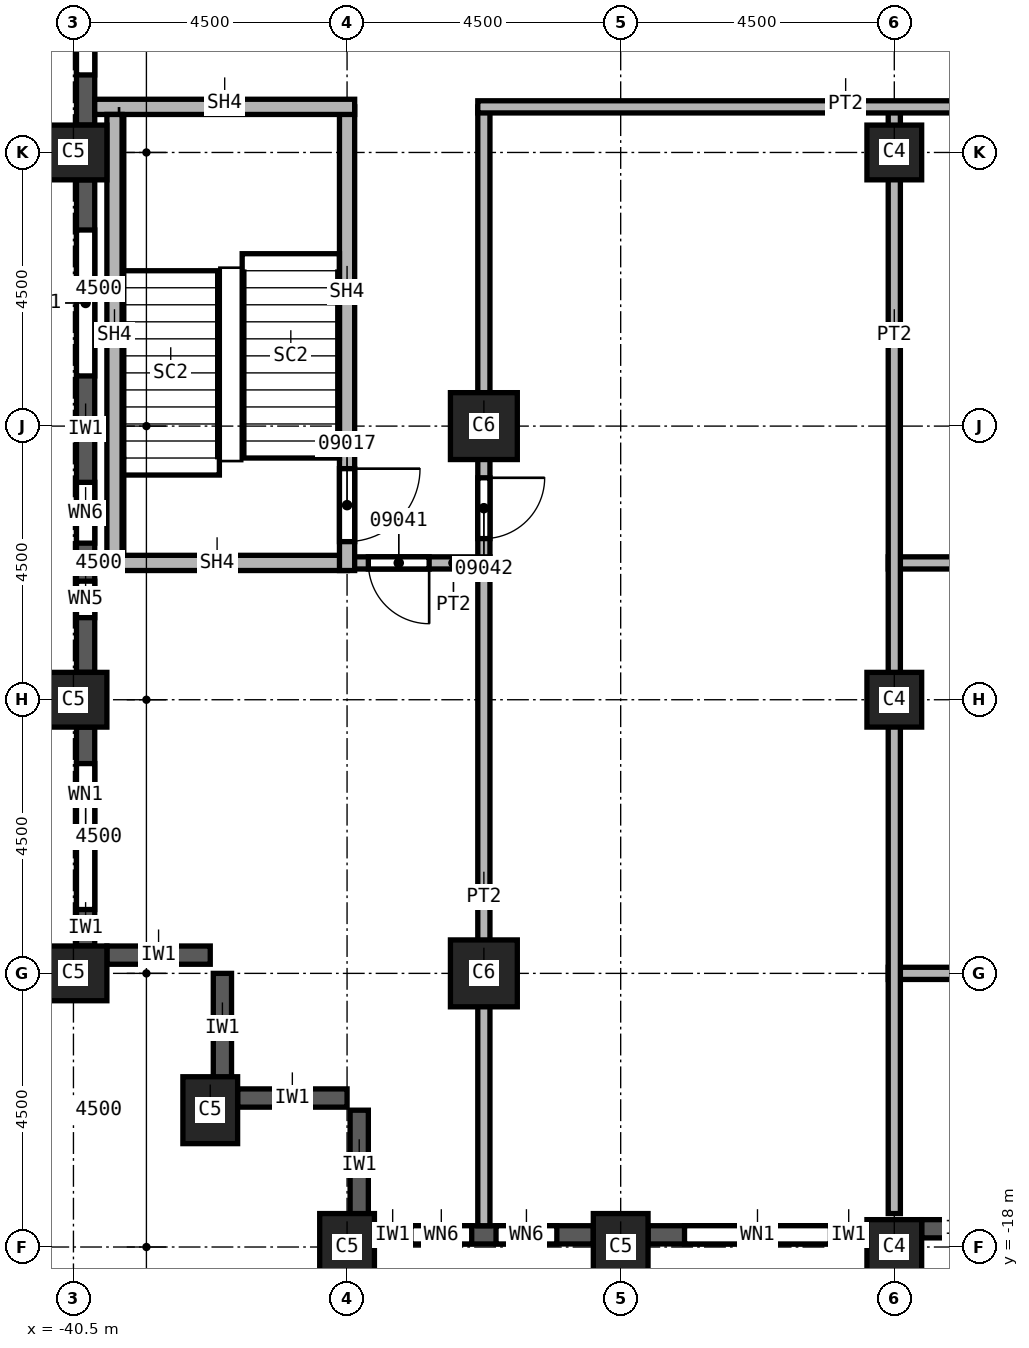
"""IFC4 building model, lengths in metres.
Left out: names, types, materials, properties, quantities, classifications, styles, units other than length and angle.
Written with IfcOpenShell. Run it as: python <this file> out.ifc"""

import sys

from ifc_helpers import new_model, si_unit, direction, frame, frame_2d, origin, origin_2d, place, context, subcontext, project, spatial, rectangle, extrude, element, fill, save


model = new_model("IFC4")
c1 = context("Model", 3, precision=1e-05, world=origin(), true_north=direction((0.0, 1.0)))
c2 = subcontext(c1, "Body", "Model", "MODEL_VIEW")
j1 = project(units=[si_unit("LENGTHUNIT", "METRE"), si_unit("PLANEANGLEUNIT", "RADIAN")], contexts=[c1])
p1 = place(None, origin())
s1 = spatial("IfcSite", under=j1, at=p1, CompositionType="ELEMENT")
p2 = place(p1, origin())
s2 = spatial("IfcBuilding", under=s1, at=p2, CompositionType="ELEMENT")
p3 = place(p2, frame((0.0, 0.0, 166.0)))
s3 = spatial("IfcBuildingStorey", under=s2, at=p3, CompositionType="ELEMENT", Elevation=166.0)
for number, where, z_axis, x_axis in (
    (1, (-40.5, 0.0, 0.0), (0.0, 0.0, 1.0), (0.0, 1.0, 0.0)),
    (2, (-40.5, -9.0, 0.0), (0.0, 0.0, 1.0), (0.0, 1.0, 0.0)),
    (3, (-40.5, -13.5, 0.0), (0.0, 0.0, 1.0), (0.0, 1.0, 0.0)),
    (4, (-38.25, -15.75, 0.0), (0.0, 0.0, 1.0), (1.0, 0.0, 0.0)),
    (5, (-31.5, -18.0, 0.0), (0.0, 0.0, 1.0), (1.0, 0.0, 0.0)),
    (6, (-36.0, -18.0, 0.0), (0.0, 0.0, 1.0), (1.0, 0.0, 0.0)),
):
    element("IfcColumn", number, at=place(p3, frame(where, z_axis=z_axis, x_axis=x_axis)), inside=s3, PredefinedType="COLUMN", context=c2, shape_type="SweptSolid", body=[
        extrude(rectangle(XDim=0.9, YDim=1.1, at=origin_2d()), origin(), (0.0, 0.0, 1.0), 3.7),
    ])
for number, where, z_axis, x_axis in (
    (7, (-33.75, -4.5, 0.0), (0.0, 0.0, 1.0), (1.0, 0.0, 0.0)),
    (8, (-33.75, -13.5, 0.0), (0.0, 0.0, 1.0), (1.0, 0.0, 0.0)),
):
    element("IfcColumn", number, at=place(p3, frame(where, z_axis=z_axis, x_axis=x_axis)), inside=s3, PredefinedType="COLUMN", context=c2, shape_type="SweptSolid", body=[
        extrude(rectangle(XDim=1.1, YDim=1.1, at=origin_2d()), origin(), (0.0, 0.0, 1.0), 3.7),
    ])
for number, where, z_axis, x_axis in (
    (9, (-27.0, 0.0, 0.0), (0.0, 0.0, 1.0), (1.0, 0.0, 0.0)),
    (10, (-27.0, -9.0, 0.0), (0.0, 0.0, 1.0), (1.0, 0.0, 0.0)),
    (11, (-27.0, -18.0, 0.0), (0.0, 0.0, 1.0), (1.0, 0.0, 0.0)),
):
    element("IfcColumn", number, at=place(p3, frame(where, z_axis=z_axis, x_axis=x_axis)), inside=s3, PredefinedType="COLUMN", context=c2, shape_type="SweptSolid", body=[
        extrude(rectangle(XDim=0.9, YDim=0.9, at=origin_2d()), origin(), (0.0, 0.0, 1.0), 3.7),
    ])
p4 = place(p3, frame((-39.95, -13.2, 0.0), z_axis=(0.0, 0.0, 1.0), x_axis=(1.0, 0.0, 0.0)))
e12 = element("IfcWall", 12, at=p4, inside=s3, PredefinedType="SOLIDWALL", context=c2, shape_type="SweptSolid", body=[
    extrude(rectangle(XDim=1.7, YDim=0.3, at=frame_2d((0.85, 0.0))), origin(), (0.0, 0.0, 1.0), 3.1),
])
for number, where, z_axis, x_axis in (
    (13, (-38.05, -15.3, 0.0), (0.0, 0.0, 1.0), (0.0, 1.0, 0.0)),
    (14, (-37.8, -15.55, 0.0), (0.0, 0.0, 1.0), (1.0, 0.0, 0.0)),
    (15, (-35.8, -17.55, 0.0), (0.0, 0.0, 1.0), (0.0, 1.0, 0.0)),
):
    element("IfcWall", number, at=place(p3, frame(where, z_axis=z_axis, x_axis=x_axis)), inside=s3, PredefinedType="SOLIDWALL", context=c2, shape_type="SweptSolid", body=[
        extrude(rectangle(XDim=1.8, YDim=0.3, at=frame_2d((0.9, 0.0))), origin(), (0.0, 0.0, 1.0), 3.1),
    ])
p5 = place(p3, frame((-40.3, 8.55, 0.0), z_axis=(0.0, 0.0, 1.0), x_axis=(0.0, -1.0, 0.0)))
e16 = element("IfcWall", 16, at=p5, inside=s3, PredefinedType="SOLIDWALL", context=c2, shape_type="SweptSolid", body=[
    extrude(rectangle(XDim=8.1, YDim=0.3, at=frame_2d((4.05, 0.0))), origin(), (0.0, 0.0, 1.0), 3.1),
])
p6 = place(p5, frame((0.825, 0.0, 0.8)))
e17 = element("IfcOpeningElement", 17, at=p6, cuts=e16, PredefinedType="OPENING", context=c2, shape_type="SweptSolid", body=[
    extrude(rectangle(XDim=2.4, YDim=1.95, at=frame_2d((1.2, 0.975))), frame((0.0, 0.15, 0.0), z_axis=(0.0, -1.0, 0.0), x_axis=(1.0, 0.0, 0.0)), (0.0, 0.0, 1.0), 0.3),
])
p7 = place(p5, frame((4.875, 0.0, 0.8)))
e18 = element("IfcOpeningElement", 18, at=p7, cuts=e16, PredefinedType="OPENING", context=c2, shape_type="SweptSolid", body=[
    extrude(rectangle(XDim=2.4, YDim=1.95, at=frame_2d((1.2, 0.975))), frame((0.0, 0.15, 0.0), z_axis=(0.0, -1.0, 0.0), x_axis=(1.0, 0.0, 0.0)), (0.0, 0.0, 1.0), 0.3),
])
p8 = place(p3, frame((-40.3, -0.45, 0.0), z_axis=(0.0, 0.0, 1.0), x_axis=(0.0, -1.0, 0.0)))
e19 = element("IfcWall", 19, at=p8, inside=s3, PredefinedType="SOLIDWALL", context=c2, shape_type="SweptSolid", body=[
    extrude(rectangle(XDim=8.1, YDim=0.3, at=frame_2d((4.05, 0.0))), origin(), (0.0, 0.0, 1.0), 3.1),
])
p9 = place(p8, frame((0.825, 0.0, 0.8)))
e20 = element("IfcOpeningElement", 20, at=p9, cuts=e19, PredefinedType="OPENING", context=c2, shape_type="SweptSolid", body=[
    extrude(rectangle(XDim=2.4, YDim=1.95, at=frame_2d((1.2, 0.975))), frame((0.0, 0.15, 0.0), z_axis=(0.0, -1.0, 0.0), x_axis=(1.0, 0.0, 0.0)), (0.0, 0.0, 1.0), 0.3),
])
p10 = place(p8, frame((4.975, 0.0, 0.8)))
e21 = element("IfcOpeningElement", 21, at=p10, cuts=e19, PredefinedType="OPENING", context=c2, shape_type="SweptSolid", body=[
    extrude(rectangle(XDim=1.0, YDim=1.95, at=frame_2d((0.5, 0.975))), frame((0.0, 0.15, 0.0), z_axis=(0.0, -1.0, 0.0), x_axis=(1.0, 0.0, 0.0)), (0.0, 0.0, 1.0), 0.3),
])
p11 = place(p8, frame((6.6, 0.0, 0.8)))
e22 = element("IfcOpeningElement", 22, at=p11, cuts=e19, PredefinedType="OPENING", context=c2, shape_type="SweptSolid", body=[
    extrude(rectangle(XDim=0.6, YDim=1.95, at=frame_2d((0.3, 0.975))), frame((0.0, 0.15, 0.0), z_axis=(0.0, -1.0, 0.0), x_axis=(1.0, 0.0, 0.0)), (0.0, 0.0, 1.0), 0.3),
])
p12 = place(p3, frame((-40.3, -9.45, 0.0), z_axis=(0.0, 0.0, 1.0), x_axis=(0.0, -1.0, 0.0)))
e23 = element("IfcWall", 23, at=p12, inside=s3, PredefinedType="SOLIDWALL", context=c2, shape_type="SweptSolid", body=[
    extrude(rectangle(XDim=3.6, YDim=0.3, at=frame_2d((1.8, 0.0))), origin(), (0.0, 0.0, 1.0), 3.1),
])
p13 = place(p12, frame((0.6, 0.0, 0.8)))
e24 = element("IfcOpeningElement", 24, at=p13, cuts=e23, PredefinedType="OPENING", context=c2, shape_type="SweptSolid", body=[
    extrude(rectangle(XDim=2.4, YDim=1.95, at=frame_2d((1.2, 0.975))), frame((0.0, 0.15, 0.0), z_axis=(0.0, -1.0, 0.0), x_axis=(1.0, 0.0, 0.0)), (0.0, 0.0, 1.0), 0.3),
])
p14 = place(p3, frame((-35.55, -17.8, 0.0), z_axis=(0.0, 0.0, 1.0), x_axis=(1.0, 0.0, 0.0)))
e25 = element("IfcWall", 25, at=p14, inside=s3, PredefinedType="SOLIDWALL", context=c2, shape_type="SweptSolid", body=[
    extrude(rectangle(XDim=3.6, YDim=0.3, at=frame_2d((1.8, 0.0))), origin(), (0.0, 0.0, 1.0), 3.1),
])
p15 = place(p14, frame((0.6, 0.0, 0.8)))
e26 = element("IfcOpeningElement", 26, at=p15, cuts=e25, PredefinedType="OPENING", context=c2, shape_type="SweptSolid", body=[
    extrude(rectangle(XDim=1.0, YDim=1.95, at=frame_2d((0.5, 0.975))), frame((0.0, 0.15, 0.0), z_axis=(0.0, -1.0, 0.0), x_axis=(1.0, 0.0, 0.0)), (0.0, 0.0, 1.0), 0.3),
])
p16 = place(p14, frame((2.0, 0.0, 0.8)))
e27 = element("IfcOpeningElement", 27, at=p16, cuts=e25, PredefinedType="OPENING", context=c2, shape_type="SweptSolid", body=[
    extrude(rectangle(XDim=1.0, YDim=1.95, at=frame_2d((0.5, 0.975))), frame((0.0, 0.15, 0.0), z_axis=(0.0, -1.0, 0.0), x_axis=(1.0, 0.0, 0.0)), (0.0, 0.0, 1.0), 0.3),
])
p17 = place(p3, frame((-31.05, -17.8, 0.0), z_axis=(0.0, 0.0, 1.0), x_axis=(1.0, 0.0, 0.0)))
e28 = element("IfcWall", 28, at=p17, inside=s3, PredefinedType="SOLIDWALL", context=c2, shape_type="SweptSolid", body=[
    extrude(rectangle(XDim=3.6, YDim=0.3, at=frame_2d((1.8, 0.0))), origin(), (0.0, 0.0, 1.0), 3.1),
])
p18 = place(p17, frame((0.6, 0.0, 0.8)))
e29 = element("IfcOpeningElement", 29, at=p18, cuts=e28, PredefinedType="OPENING", context=c2, shape_type="SweptSolid", body=[
    extrude(rectangle(XDim=2.4, YDim=1.95, at=frame_2d((1.2, 0.975))), frame((0.0, 0.15, 0.0), z_axis=(0.0, -1.0, 0.0), x_axis=(1.0, 0.0, 0.0)), (0.0, 0.0, 1.0), 0.3),
])
p19 = place(p3, frame((-26.55, -17.7, 0.0), z_axis=(0.0, 0.0, 1.0), x_axis=(1.0, 0.0, 0.0)))
e30 = element("IfcWall", 30, at=p19, inside=s3, PredefinedType="SOLIDWALL", context=c2, shape_type="SweptSolid", body=[
    extrude(rectangle(XDim=1.35, YDim=0.3, at=frame_2d((0.675, 0.0))), origin(), (0.0, 0.0, 1.0), 3.1),
])
p20 = place(p3, frame((-33.75, 0.75, 0.0), z_axis=(0.0, 0.0, 1.0), x_axis=(0.0, -1.0, 0.0)))
e31 = element("IfcWall", 31, at=p20, inside=s3, PredefinedType="PARTITIONING", context=c2, shape_type="SweptSolid", body=[
    extrude(rectangle(XDim=18.4, YDim=0.2, at=frame_2d((9.2, 0.0))), origin(), (0.0, 0.0, 1.0), 3.7),
])
p21 = place(p20, frame((6.1, 0.0, 0.0)))
e32 = element("IfcOpeningElement", 32, at=p21, cuts=e31, PredefinedType="OPENING", context=c2, shape_type="SweptSolid", body=[
    extrude(rectangle(XDim=1.0, YDim=2.1, at=frame_2d((0.5, 1.05))), frame((0.0, 0.1, 0.0), z_axis=(0.0, -1.0, 0.0), x_axis=(1.0, 0.0, 0.0)), (0.0, 0.0, 1.0), 0.2),
])
p22 = place(p3, frame((-33.65, -6.75, 0.0), z_axis=(0.0, 0.0, 1.0), x_axis=(-1.0, 0.0, 0.0)))
e33 = element("IfcWall", 33, at=p22, inside=s3, PredefinedType="PARTITIONING", context=c2, shape_type="SweptSolid", body=[
    extrude(rectangle(XDim=2.35, YDim=0.2, at=frame_2d((1.175, 0.0))), origin(), (0.0, 0.0, 1.0), 3.7),
])
p23 = place(p22, frame((1.0, 0.0, 0.0)))
e34 = element("IfcOpeningElement", 34, at=p23, cuts=e33, PredefinedType="OPENING", context=c2, shape_type="SweptSolid", body=[
    extrude(rectangle(XDim=1.0, YDim=2.1, at=frame_2d((0.5, 1.05))), frame((0.0, 0.1, 0.0), z_axis=(0.0, -1.0, 0.0), x_axis=(1.0, 0.0, 0.0)), (0.0, 0.0, 1.0), 0.2),
])
for number, where, z_axis, x_axis in (
    (35, (-27.1, -13.5, 0.0), (0.0, 0.0, 1.0), (1.0, 0.0, 0.0)),
    (36, (-27.1, -6.75, 0.0), (0.0, 0.0, 1.0), (1.0, 0.0, 0.0)),
):
    element("IfcWall", number, at=place(p3, frame(where, z_axis=z_axis, x_axis=x_axis)), inside=s3, PredefinedType="PARTITIONING", context=c2, shape_type="SweptSolid", body=[
        extrude(rectangle(XDim=11.7, YDim=0.2, at=frame_2d((5.85, 0.0))), origin(), (0.0, 0.0, 1.0), 3.7),
    ])
p24 = place(p3, frame((-27.0, -17.45, 0.0), z_axis=(0.0, 0.0, 1.0), x_axis=(0.0, 1.0, 0.0)))
e37 = element("IfcWall", 37, at=p24, inside=s3, PredefinedType="PARTITIONING", context=c2, shape_type="SweptSolid", body=[
    extrude(rectangle(XDim=18.2, YDim=0.2, at=frame_2d((9.1, 0.0))), origin(), (0.0, 0.0, 1.0), 3.7),
])
p25 = place(p3, frame((-15.4, 0.75, 0.0), z_axis=(0.0, 0.0, 1.0), x_axis=(-1.0, 0.0, 0.0)))
e38 = element("IfcWall", 38, at=p25, inside=s3, PredefinedType="PARTITIONING", context=c2, shape_type="SweptSolid", body=[
    extrude(rectangle(XDim=18.45, YDim=0.2, at=frame_2d((9.225, 0.0))), origin(), (0.0, 0.0, 1.0), 3.7),
])
p26 = place(p25, frame((5.35, 0.0, 0.0)))
e39 = element("IfcOpeningElement", 39, at=p26, cuts=e38, PredefinedType="OPENING", context=c2, shape_type="SweptSolid", body=[
    extrude(rectangle(XDim=1.0, YDim=2.1, at=frame_2d((0.5, 1.05))), frame((0.0, 0.1, 0.0), z_axis=(0.0, -1.0, 0.0), x_axis=(1.0, 0.0, 0.0)), (0.0, 0.0, 1.0), 0.2),
])
p27 = place(p3, frame((-36.0, -6.75, 0.0), z_axis=(0.0, 0.0, 1.0), x_axis=(-1.0, 0.0, 0.0)))
e40 = element("IfcWall", 40, at=p27, inside=s3, PredefinedType="SOLIDWALL", context=c2, shape_type="SweptSolid", body=[
    extrude(rectangle(XDim=4.15, YDim=0.25, at=frame_2d((2.075, 0.0))), origin(), (0.0, 0.0, 1.0), 3.7),
])
p28 = place(p3, frame((-36.0, 0.75, 0.0), z_axis=(0.0, 0.0, 1.0), x_axis=(0.0, -1.0, 0.0)))
e41 = element("IfcWall", 41, at=p28, inside=s3, PredefinedType="SOLIDWALL", context=c2, shape_type="SweptSolid", body=[
    extrude(rectangle(XDim=7.625, YDim=0.25, at=frame_2d((3.812, 0.0))), origin(), (0.0, 0.0, 1.0), 3.7),
])
p29 = place(p28, frame((5.95, 0.0, 0.0)))
e42 = element("IfcOpeningElement", 42, at=p29, cuts=e41, PredefinedType="OPENING", context=c2, shape_type="SweptSolid", body=[
    extrude(rectangle(XDim=1.2, YDim=2.1, at=frame_2d((0.6, 1.05))), frame((0.0, 0.125, 0.0), z_axis=(0.0, -1.0, 0.0), x_axis=(1.0, 0.0, 0.0)), (0.0, 0.0, 1.0), 0.25),
])
p30 = place(p3, frame((-35.875, 0.75, 0.0), z_axis=(0.0, 0.0, 1.0), x_axis=(-1.0, 0.0, 0.0)))
e43 = element("IfcWall", 43, at=p30, inside=s3, PredefinedType="SOLIDWALL", context=c2, shape_type="SweptSolid", body=[
    extrude(rectangle(XDim=4.275, YDim=0.25, at=frame_2d((2.137, 0.0))), origin(), (0.0, 0.0, 1.0), 3.7),
])
p31 = place(p3, frame((-39.825, -6.625, 0.0), z_axis=(0.0, 0.0, 1.0), x_axis=(0.0, 1.0, 0.0)))
e44 = element("IfcWall", 44, at=p31, inside=s3, PredefinedType="SOLIDWALL", context=c2, shape_type="SweptSolid", body=[
    extrude(rectangle(XDim=7.25, YDim=0.25, at=frame_2d((3.625, 0.0))), origin(), (0.0, 0.0, 1.0), 3.7),
])
p32 = place(p7, origin())
e45 = element("IfcWindow", 45, at=p32, inside=s3, PartitioningType="SINGLE_PANEL", PredefinedType="WINDOW", context=c2, shape_type="SweptSolid", body=[
    extrude(rectangle(XDim=2.4, YDim=1.95, at=frame_2d((1.2, 0.975))), frame((0.0, 0.03, 0.0), z_axis=(0.0, -1.0, 0.0), x_axis=(1.0, 0.0, 0.0)), (0.0, 0.0, 1.0), 0.06),
])
fill(e18, e45)
p33 = place(p9, origin())
e46 = element("IfcWindow", 46, at=p33, inside=s3, PartitioningType="SINGLE_PANEL", PredefinedType="WINDOW", context=c2, shape_type="SweptSolid", body=[
    extrude(rectangle(XDim=2.4, YDim=1.95, at=frame_2d((1.2, 0.975))), frame((0.0, 0.03, 0.0), z_axis=(0.0, -1.0, 0.0), x_axis=(1.0, 0.0, 0.0)), (0.0, 0.0, 1.0), 0.06),
])
fill(e20, e46)
p34 = place(p13, origin())
e47 = element("IfcWindow", 47, at=p34, inside=s3, PartitioningType="SINGLE_PANEL", PredefinedType="WINDOW", context=c2, shape_type="SweptSolid", body=[
    extrude(rectangle(XDim=2.4, YDim=1.95, at=frame_2d((1.2, 0.975))), frame((0.0, 0.03, 0.0), z_axis=(0.0, -1.0, 0.0), x_axis=(1.0, 0.0, 0.0)), (0.0, 0.0, 1.0), 0.06),
])
fill(e24, e47)
p35 = place(p18, origin())
e48 = element("IfcWindow", 48, at=p35, inside=s3, PartitioningType="SINGLE_PANEL", PredefinedType="WINDOW", context=c2, shape_type="SweptSolid", body=[
    extrude(rectangle(XDim=2.4, YDim=1.95, at=frame_2d((1.2, 0.975))), frame((0.0, 0.03, 0.0), z_axis=(0.0, -1.0, 0.0), x_axis=(1.0, 0.0, 0.0)), (0.0, 0.0, 1.0), 0.06),
])
fill(e29, e48)
p36 = place(p29, origin())
e49 = element("IfcDoor", 49, at=p36, inside=s3, OperationType="SINGLE_SWING_RIGHT", PredefinedType="DOOR", context=c2, shape_type="SweptSolid", body=[
    extrude(rectangle(XDim=1.2, YDim=2.1, at=frame_2d((0.6, 1.05))), frame((0.0, 0.025, 0.0), z_axis=(0.0, -1.0, 0.0), x_axis=(1.0, 0.0, 0.0)), (0.0, 0.0, 1.0), 0.05),
])
fill(e42, e49)
p37 = place(p23, origin())
e50 = element("IfcDoor", 50, at=p37, inside=s3, OperationType="SINGLE_SWING_RIGHT", PredefinedType="DOOR", context=c2, shape_type="SweptSolid", body=[
    extrude(rectangle(XDim=1.0, YDim=2.1, at=frame_2d((0.5, 1.05))), frame((0.0, 0.025, 0.0), z_axis=(0.0, -1.0, 0.0), x_axis=(1.0, 0.0, 0.0)), (0.0, 0.0, 1.0), 0.05),
])
fill(e34, e50)
p38 = place(p21, origin())
e51 = element("IfcDoor", 51, at=p38, inside=s3, OperationType="SINGLE_SWING_LEFT", PredefinedType="DOOR", context=c2, shape_type="SweptSolid", body=[
    extrude(rectangle(XDim=1.0, YDim=2.1, at=frame_2d((0.5, 1.05))), frame((0.0, 0.025, 0.0), z_axis=(0.0, -1.0, 0.0), x_axis=(1.0, 0.0, 0.0)), (0.0, 0.0, 1.0), 0.05),
])
fill(e32, e51)
p39 = place(p10, origin())
e52 = element("IfcWindow", 52, at=p39, inside=s3, PartitioningType="SINGLE_PANEL", PredefinedType="WINDOW", context=c2, shape_type="SweptSolid", body=[
    extrude(rectangle(XDim=1.0, YDim=1.95, at=frame_2d((0.5, 0.975))), frame((0.0, 0.03, 0.0), z_axis=(0.0, -1.0, 0.0), x_axis=(1.0, 0.0, 0.0)), (0.0, 0.0, 1.0), 0.06),
])
fill(e21, e52)
p40 = place(p11, origin())
e53 = element("IfcWindow", 53, at=p40, inside=s3, PartitioningType="SINGLE_PANEL", PredefinedType="WINDOW", context=c2, shape_type="SweptSolid", body=[
    extrude(rectangle(XDim=0.6, YDim=1.95, at=frame_2d((0.3, 0.975))), frame((0.0, 0.03, 0.0), z_axis=(0.0, -1.0, 0.0), x_axis=(1.0, 0.0, 0.0)), (0.0, 0.0, 1.0), 0.06),
])
fill(e22, e53)
p41 = place(p15, origin())
e54 = element("IfcWindow", 54, at=p41, inside=s3, PartitioningType="SINGLE_PANEL", PredefinedType="WINDOW", context=c2, shape_type="SweptSolid", body=[
    extrude(rectangle(XDim=1.0, YDim=1.95, at=frame_2d((0.5, 0.975))), frame((0.0, 0.03, 0.0), z_axis=(0.0, -1.0, 0.0), x_axis=(1.0, 0.0, 0.0)), (0.0, 0.0, 1.0), 0.06),
])
fill(e26, e54)
p42 = place(p16, origin())
e55 = element("IfcWindow", 55, at=p42, inside=s3, PartitioningType="SINGLE_PANEL", PredefinedType="WINDOW", context=c2, shape_type="SweptSolid", body=[
    extrude(rectangle(XDim=1.0, YDim=1.95, at=frame_2d((0.5, 0.975))), frame((0.0, 0.03, 0.0), z_axis=(0.0, -1.0, 0.0), x_axis=(1.0, 0.0, 0.0)), (0.0, 0.0, 1.0), 0.06),
])
fill(e27, e55)
save(model, sys.argv[1])
